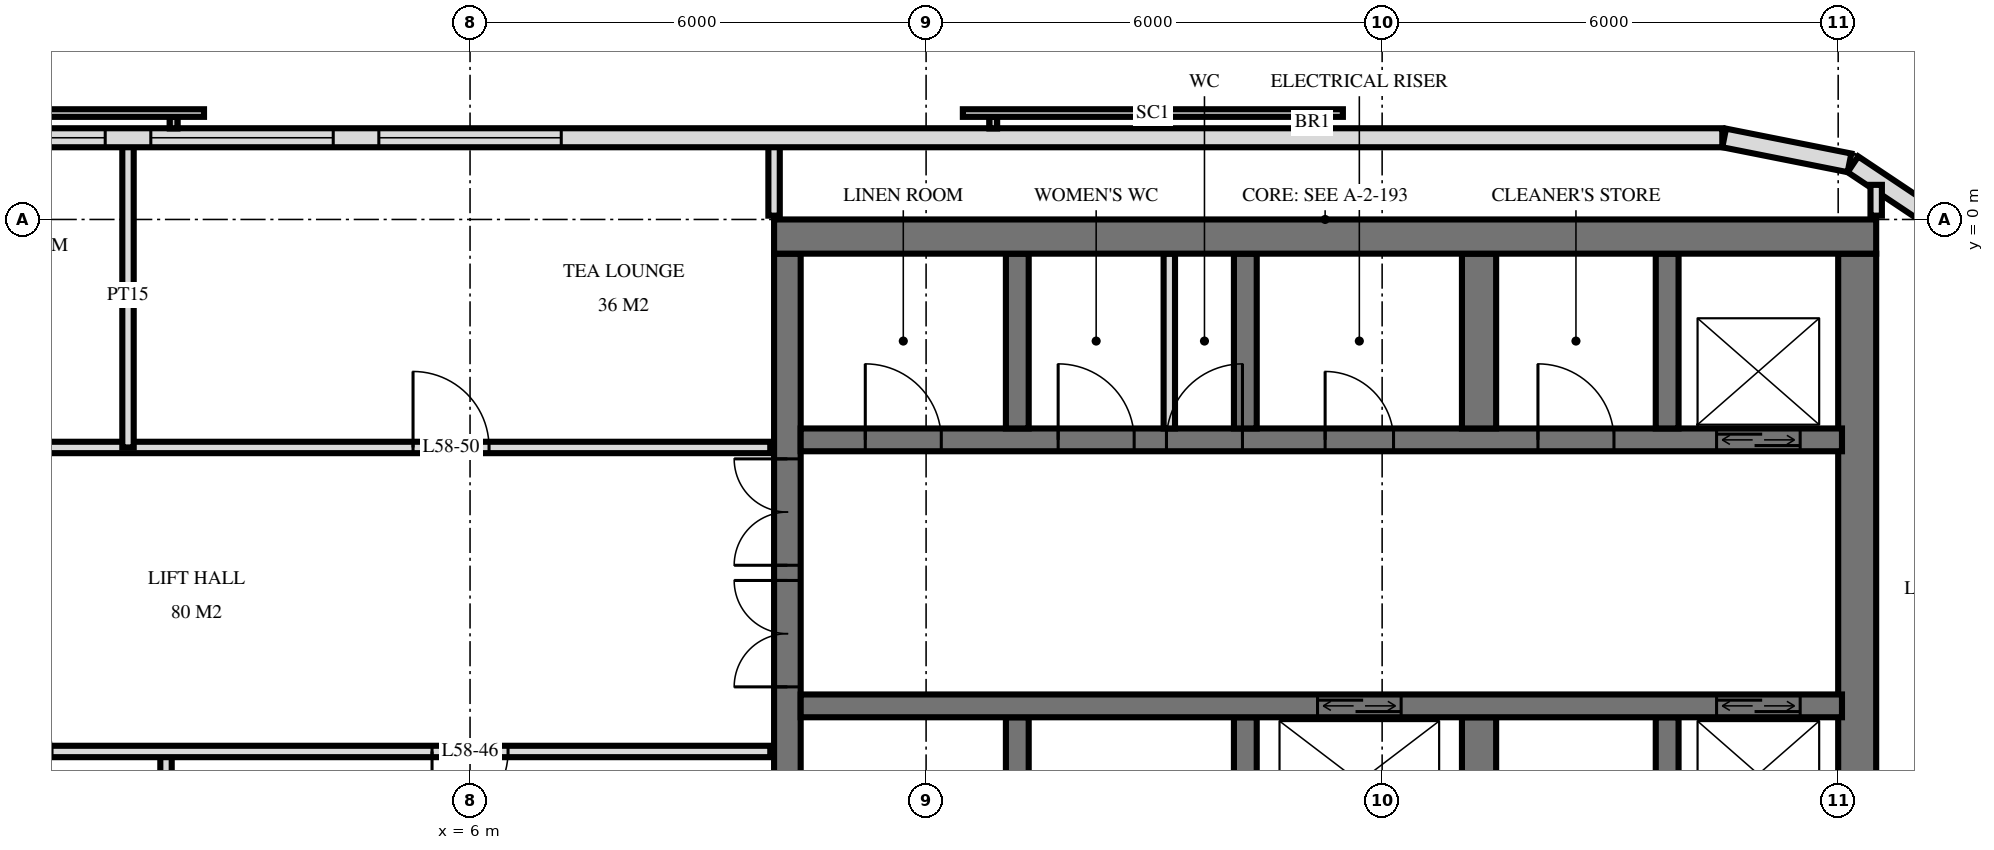
"""IFC4 building model, lengths in metres.
Left out: names, types, materials, properties, quantities, classifications, styles, units other than length and angle.
Written with IfcOpenShell. Run it as: python <this file> out.ifc"""

import sys

from ifc_helpers import new_model, si_unit, direction, frame, frame_2d, origin, place, context, subcontext, project, spatial, rectangle, extrude, element, fill, save


model = new_model("IFC4")
c1 = context("Model", 3, precision=1e-05, world=origin(), true_north=direction((0.0, 1.0)))
c2 = subcontext(c1, "Body", "Model", "MODEL_VIEW")
j1 = project(units=[si_unit("LENGTHUNIT", "METRE"), si_unit("PLANEANGLEUNIT", "RADIAN")], contexts=[c1])
p1 = place(None, origin())
s1 = spatial("IfcSite", under=j1, at=p1, CompositionType="ELEMENT")
p2 = place(p1, origin())
s2 = spatial("IfcBuilding", under=s1, at=p2, CompositionType="ELEMENT")
p3 = place(p2, frame((0.0, 0.0, 222.1)))
s3 = spatial("IfcBuildingStorey", under=s2, at=p3, CompositionType="ELEMENT", Elevation=222.1)
p4 = place(p3, frame((10.0, -0.225, 0.0), z_axis=(0.0, 0.0, 1.0), x_axis=(1.0, 0.0, 0.0)))
e1 = element("IfcWall", 1, at=p4, inside=s3, PredefinedType="SHEAR", context=c2, shape_type="SweptSolid", body=[
    extrude(rectangle(XDim=14.5, YDim=0.45, at=frame_2d((7.25, 0.0))), origin(), (0.0, 0.0, 1.0), 3.5),
])
p5 = place(p3, frame((10.175, -14.55, 0.0), z_axis=(0.0, 0.0, 1.0), x_axis=(0.0, 1.0, 0.0)))
e2 = element("IfcWall", 2, at=p5, inside=s3, PredefinedType="SHEAR", context=c2, shape_type="SweptSolid", body=[
    extrude(rectangle(XDim=14.1, YDim=0.35, at=frame_2d((7.05, 0.0))), origin(), (0.0, 0.0, 1.0), 3.5),
])
p6 = place(p5, frame((8.4, 0.0, 0.0)))
e3 = element("IfcOpeningElement", 3, at=p6, cuts=e2, PredefinedType="OPENING", context=c2, shape_type="SweptSolid", body=[
    extrude(rectangle(XDim=1.4, YDim=2.4, at=frame_2d((0.7, 1.2))), frame((0.0, 0.185, 0.0), z_axis=(0.0, -1.0, 0.0), x_axis=(1.0, 0.0, 0.0)), (0.0, 0.0, 1.0), 0.37),
])
p7 = place(p5, frame((10.0, 0.0, 0.0)))
e4 = element("IfcOpeningElement", 4, at=p7, cuts=e2, PredefinedType="OPENING", context=c2, shape_type="SweptSolid", body=[
    extrude(rectangle(XDim=1.4, YDim=2.4, at=frame_2d((0.7, 1.2))), frame((0.0, 0.185, 0.0), z_axis=(0.0, -1.0, 0.0), x_axis=(1.0, 0.0, 0.0)), (0.0, 0.0, 1.0), 0.37),
])
p8 = place(p5, frame((4.0, 0.0, 0.0)))
e5 = element("IfcOpeningElement", 5, at=p8, cuts=e2, PredefinedType="OPENING", context=c2, shape_type="SweptSolid", body=[
    extrude(rectangle(XDim=1.2, YDim=2.1, at=frame_2d((0.6, 1.05))), frame((0.0, 0.185, 0.0), z_axis=(0.0, -1.0, 0.0), x_axis=(1.0, 0.0, 0.0)), (0.0, 0.0, 1.0), 0.37),
])
p9 = place(p3, frame((24.25, -14.55, 0.0), z_axis=(0.0, 0.0, 1.0), x_axis=(0.0, 1.0, 0.0)))
e6 = element("IfcWall", 6, at=p9, inside=s3, PredefinedType="SHEAR", context=c2, shape_type="SweptSolid", body=[
    extrude(rectangle(XDim=14.1, YDim=0.5, at=frame_2d((7.05, 0.0))), origin(), (0.0, 0.0, 1.0), 3.5),
])
p10 = place(p3, frame((10.35, -2.9, 0.0), z_axis=(0.0, 0.0, 1.0), x_axis=(1.0, 0.0, 0.0)))
e7 = element("IfcWall", 7, at=p10, inside=s3, PredefinedType="SHEAR", context=c2, shape_type="SweptSolid", body=[
    extrude(rectangle(XDim=13.7, YDim=0.3, at=frame_2d((6.85, 0.0))), origin(), (0.0, 0.0, 1.0), 3.5),
])
p11 = place(p10, frame((12.05, 0.0, 0.0)))
e8 = element("IfcOpeningElement", 8, at=p11, cuts=e7, PredefinedType="OPENING", context=c2, shape_type="SweptSolid", body=[
    extrude(rectangle(XDim=1.1, YDim=2.1, at=frame_2d((0.55, 1.05))), frame((0.0, 0.16, 0.0), z_axis=(0.0, -1.0, 0.0), x_axis=(1.0, 0.0, 0.0)), (0.0, 0.0, 1.0), 0.32),
])
p12 = place(p10, frame((6.9, 0.0, 0.0)))
e9 = element("IfcOpeningElement", 9, at=p12, cuts=e7, PredefinedType="OPENING", context=c2, shape_type="SweptSolid", body=[
    extrude(rectangle(XDim=0.9, YDim=2.1, at=frame_2d((0.45, 1.05))), frame((0.0, 0.16, 0.0), z_axis=(0.0, -1.0, 0.0), x_axis=(1.0, 0.0, 0.0)), (0.0, 0.0, 1.0), 0.32),
])
p13 = place(p10, frame((0.85, 0.0, 0.0)))
e10 = element("IfcOpeningElement", 10, at=p13, cuts=e7, PredefinedType="OPENING", context=c2, shape_type="SweptSolid", body=[
    extrude(rectangle(XDim=1.0, YDim=2.1, at=frame_2d((0.5, 1.05))), frame((0.0, 0.16, 0.0), z_axis=(0.0, -1.0, 0.0), x_axis=(1.0, 0.0, 0.0)), (0.0, 0.0, 1.0), 0.32),
])
p14 = place(p10, frame((3.387, 0.0, 0.0)))
e11 = element("IfcOpeningElement", 11, at=p14, cuts=e7, PredefinedType="OPENING", context=c2, shape_type="SweptSolid", body=[
    extrude(rectangle(XDim=1.0, YDim=2.1, at=frame_2d((0.5, 1.05))), frame((0.0, 0.16, 0.0), z_axis=(0.0, -1.0, 0.0), x_axis=(1.0, 0.0, 0.0)), (0.0, 0.0, 1.0), 0.32),
])
p15 = place(p10, frame((4.812, 0.0, 0.0)))
e12 = element("IfcOpeningElement", 12, at=p15, cuts=e7, PredefinedType="OPENING", context=c2, shape_type="SweptSolid", body=[
    extrude(rectangle(XDim=1.0, YDim=2.1, at=frame_2d((0.5, 1.05))), frame((0.0, 0.16, 0.0), z_axis=(0.0, -1.0, 0.0), x_axis=(1.0, 0.0, 0.0)), (0.0, 0.0, 1.0), 0.32),
])
p16 = place(p10, frame((9.7, 0.0, 0.0)))
e13 = element("IfcOpeningElement", 13, at=p16, cuts=e7, PredefinedType="OPENING", context=c2, shape_type="SweptSolid", body=[
    extrude(rectangle(XDim=1.0, YDim=2.1, at=frame_2d((0.5, 1.05))), frame((0.0, 0.16, 0.0), z_axis=(0.0, -1.0, 0.0), x_axis=(1.0, 0.0, 0.0)), (0.0, 0.0, 1.0), 0.32),
])
p17 = place(p3, frame((10.35, -6.4, 0.0), z_axis=(0.0, 0.0, 1.0), x_axis=(1.0, 0.0, 0.0)))
e14 = element("IfcWall", 14, at=p17, inside=s3, PredefinedType="SHEAR", context=c2, shape_type="SweptSolid", body=[
    extrude(rectangle(XDim=13.7, YDim=0.3, at=frame_2d((6.85, 0.0))), origin(), (0.0, 0.0, 1.0), 3.5),
])
p18 = place(p17, frame((12.05, 0.0, 0.0)))
e15 = element("IfcOpeningElement", 15, at=p18, cuts=e14, PredefinedType="OPENING", context=c2, shape_type="SweptSolid", body=[
    extrude(rectangle(XDim=1.1, YDim=2.1, at=frame_2d((0.55, 1.05))), frame((0.0, 0.16, 0.0), z_axis=(0.0, -1.0, 0.0), x_axis=(1.0, 0.0, 0.0)), (0.0, 0.0, 1.0), 0.32),
])
p19 = place(p17, frame((6.8, 0.0, 0.0)))
e16 = element("IfcOpeningElement", 16, at=p19, cuts=e14, PredefinedType="OPENING", context=c2, shape_type="SweptSolid", body=[
    extrude(rectangle(XDim=1.1, YDim=2.1, at=frame_2d((0.55, 1.05))), frame((0.0, 0.16, 0.0), z_axis=(0.0, -1.0, 0.0), x_axis=(1.0, 0.0, 0.0)), (0.0, 0.0, 1.0), 0.32),
])
for number, where, z_axis, x_axis in (
    (17, (13.2, -2.75, 0.0), (0.0, 0.0, 1.0), (0.0, 1.0, 0.0)),
    (18, (13.2, -8.85, 0.0), (0.0, 0.0, 1.0), (0.0, 1.0, 0.0)),
    (19, (16.2, -2.75, 0.0), (0.0, 0.0, 1.0), (0.0, 1.0, 0.0)),
    (20, (16.2, -8.85, 0.0), (0.0, 0.0, 1.0), (0.0, 1.0, 0.0)),
):
    element("IfcWall", number, at=place(p3, frame(where, z_axis=z_axis, x_axis=x_axis)), inside=s3, PredefinedType="SHEAR", context=c2, shape_type="SweptSolid", body=[
        extrude(rectangle(XDim=2.3, YDim=0.3, at=frame_2d((1.15, 0.0))), origin(), (0.0, 0.0, 1.0), 3.5),
    ])
for number, where, z_axis, x_axis in (
    (21, (19.275, -2.75, 0.0), (0.0, 0.0, 1.0), (0.0, 1.0, 0.0)),
    (22, (19.275, -8.85, 0.0), (0.0, 0.0, 1.0), (0.0, 1.0, 0.0)),
):
    element("IfcWall", number, at=place(p3, frame(where, z_axis=z_axis, x_axis=x_axis)), inside=s3, PredefinedType="SHEAR", context=c2, shape_type="SweptSolid", body=[
        extrude(rectangle(XDim=2.3, YDim=0.45, at=frame_2d((1.15, 0.0))), origin(), (0.0, 0.0, 1.0), 3.5),
    ])
for number, where, z_axis, x_axis in (
    (23, (21.75, -2.75, 0.0), (0.0, 0.0, 1.0), (0.0, 1.0, 0.0)),
    (24, (21.75, -8.85, 0.0), (0.0, 0.0, 1.0), (0.0, 1.0, 0.0)),
):
    element("IfcWall", number, at=place(p3, frame(where, z_axis=z_axis, x_axis=x_axis)), inside=s3, PredefinedType="SHEAR", context=c2, shape_type="SweptSolid", body=[
        extrude(rectangle(XDim=2.3, YDim=0.3, at=frame_2d((1.15, 0.0))), origin(), (0.0, 0.0, 1.0), 3.5),
    ])
p20 = place(p3, frame((25.571, -0.194, 0.0), z_axis=(0.0, 0.0, 1.0), x_axis=(-0.831482937015, 0.55555029066, 0.0)))
e25 = element("IfcWall", 25, at=p20, inside=s3, PredefinedType="SOLIDWALL", context=c2, shape_type="SweptSolid", body=[
    extrude(rectangle(XDim=1.656, YDim=0.25, at=frame_2d((0.828, 0.0))), origin(), (0.0, 0.0, 1.0), 3.22),
])
p21 = place(p3, frame((24.149, 0.745, 0.0), z_axis=(0.0, 0.0, 1.0), x_axis=(-0.980803419081, 0.194999110559, 0.0)))
e26 = element("IfcWall", 26, at=p21, inside=s3, PredefinedType="SOLIDWALL", context=c2, shape_type="SweptSolid", body=[
    extrude(rectangle(XDim=1.681, YDim=0.25, at=frame_2d((0.841, 0.0))), origin(), (0.0, 0.0, 1.0), 3.22),
])
p22 = place(p3, frame((22.475, 1.075, 0.0), z_axis=(0.0, 0.0, 1.0), x_axis=(-1.0, 0.0, 0.0)))
e27 = element("IfcWall", 27, at=p22, inside=s3, PredefinedType="SOLIDWALL", context=c2, shape_type="SweptSolid", body=[
    extrude(rectangle(XDim=44.951, YDim=0.25, at=frame_2d((22.475, 0.0))), origin(), (0.0, 0.0, 1.0), 3.22),
])
p23 = place(p22, frame((15.275, 0.0, 0.9)))
e28 = element("IfcOpeningElement", 28, at=p23, cuts=e27, PredefinedType="OPENING", context=c2, shape_type="SweptSolid", body=[
    extrude(rectangle(XDim=2.4, YDim=1.5, at=frame_2d((1.2, 0.75))), frame((0.0, 0.135, 0.0), z_axis=(0.0, -1.0, 0.0), x_axis=(1.0, 0.0, 0.0)), (0.0, 0.0, 1.0), 0.27),
])
p24 = place(p22, frame((18.275, 0.0, 0.9)))
e29 = element("IfcOpeningElement", 29, at=p24, cuts=e27, PredefinedType="OPENING", context=c2, shape_type="SweptSolid", body=[
    extrude(rectangle(XDim=2.4, YDim=1.5, at=frame_2d((1.2, 0.75))), frame((0.0, 0.135, 0.0), z_axis=(0.0, -1.0, 0.0), x_axis=(1.0, 0.0, 0.0)), (0.0, 0.0, 1.0), 0.27),
])
p25 = place(p22, frame((21.275, 0.0, 0.9)))
e30 = element("IfcOpeningElement", 30, at=p25, cuts=e27, PredefinedType="OPENING", context=c2, shape_type="SweptSolid", body=[
    extrude(rectangle(XDim=2.4, YDim=1.5, at=frame_2d((1.2, 0.75))), frame((0.0, 0.135, 0.0), z_axis=(0.0, -1.0, 0.0), x_axis=(1.0, 0.0, 0.0)), (0.0, 0.0, 1.0), 0.27),
])
p26 = place(p22, frame((24.275, 0.0, 0.9)))
e31 = element("IfcOpeningElement", 31, at=p26, cuts=e27, PredefinedType="OPENING", context=c2, shape_type="SweptSolid", body=[
    extrude(rectangle(XDim=2.4, YDim=1.5, at=frame_2d((1.2, 0.75))), frame((0.0, 0.135, 0.0), z_axis=(0.0, -1.0, 0.0), x_axis=(1.0, 0.0, 0.0)), (0.0, 0.0, 1.0), 0.27),
])
p27 = place(p3, frame((15.2, -2.75, 0.0), z_axis=(0.0, 0.0, 1.0), x_axis=(0.0, 1.0, 0.0)))
e32 = element("IfcWall", 32, at=p27, inside=s3, PredefinedType="PARTITIONING", context=c2, shape_type="SweptSolid", body=[
    extrude(rectangle(XDim=2.3, YDim=0.15, at=frame_2d((1.15, 0.0))), origin(), (0.0, 0.0, 1.0), 3.2),
])
p28 = place(p3, frame((24.5, 0.05, 0.0), z_axis=(0.0, 0.0, 1.0), x_axis=(0.0, 1.0, 0.0)))
e33 = element("IfcWall", 33, at=p28, inside=s3, PredefinedType="PARTITIONING", context=c2, shape_type="SweptSolid", body=[
    extrude(rectangle(XDim=0.405, YDim=0.15, at=frame_2d((0.203, 0.0))), origin(), (0.0, 0.0, 1.0), 3.22),
])
p29 = place(p3, frame((10.0, 0.05, 0.0), z_axis=(0.0, 0.0, 1.0), x_axis=(0.0, 1.0, 0.0)))
e34 = element("IfcWall", 34, at=p29, inside=s3, PredefinedType="PARTITIONING", context=c2, shape_type="SweptSolid", body=[
    extrude(rectangle(XDim=0.97, YDim=0.15, at=frame_2d((0.485, 0.0))), origin(), (0.0, 0.0, 1.0), 3.22),
])
p30 = place(p3, frame((2.0, -11.0, 0.0), z_axis=(0.0, 0.0, 1.0), x_axis=(0.0, 1.0, 0.0)))
e35 = element("IfcWall", 35, at=p30, inside=s3, PredefinedType="PARTITIONING", context=c2, shape_type="SweptSolid", body=[
    extrude(rectangle(XDim=4.0, YDim=0.15, at=frame_2d((2.0, 0.0))), origin(), (0.0, 0.0, 1.0), 3.22),
])
p31 = place(p3, frame((1.5, -3.0, 0.0), z_axis=(0.0, 0.0, 1.0), x_axis=(0.0, 1.0, 0.0)))
e36 = element("IfcWall", 36, at=p31, inside=s3, PredefinedType="PARTITIONING", context=c2, shape_type="SweptSolid", body=[
    extrude(rectangle(XDim=4.02, YDim=0.15, at=frame_2d((2.01, 0.0))), origin(), (0.0, 0.0, 1.0), 3.22),
])
p32 = place(p3, frame((-9.95, -7.0, 0.0), z_axis=(0.0, 0.0, 1.0), x_axis=(1.0, 0.0, 0.0)))
e37 = element("IfcWall", 37, at=p32, inside=s3, PredefinedType="PARTITIONING", context=c2, shape_type="SweptSolid", body=[
    extrude(rectangle(XDim=19.9, YDim=0.15, at=frame_2d((9.95, 0.0))), origin(), (0.0, 0.0, 1.0), 3.22),
])
p33 = place(p32, frame((9.45, 0.0, 0.0)))
e38 = element("IfcOpeningElement", 38, at=p33, cuts=e37, PredefinedType="OPENING", context=c2, shape_type="SweptSolid", body=[
    extrude(rectangle(XDim=1.0, YDim=2.1, at=frame_2d((0.5, 1.05))), frame((0.0, 0.085, 0.0), z_axis=(0.0, -1.0, 0.0), x_axis=(1.0, 0.0, 0.0)), (0.0, 0.0, 1.0), 0.17),
])
p34 = place(p32, frame((15.45, 0.0, 0.0)))
e39 = element("IfcOpeningElement", 39, at=p34, cuts=e37, PredefinedType="OPENING", context=c2, shape_type="SweptSolid", body=[
    extrude(rectangle(XDim=1.0, YDim=2.1, at=frame_2d((0.5, 1.05))), frame((0.0, 0.085, 0.0), z_axis=(0.0, -1.0, 0.0), x_axis=(1.0, 0.0, 0.0)), (0.0, 0.0, 1.0), 0.17),
])
p35 = place(p3, frame((-9.95, -3.0, 0.0), z_axis=(0.0, 0.0, 1.0), x_axis=(1.0, 0.0, 0.0)))
e40 = element("IfcWall", 40, at=p35, inside=s3, PredefinedType="PARTITIONING", context=c2, shape_type="SweptSolid", body=[
    extrude(rectangle(XDim=19.9, YDim=0.15, at=frame_2d((9.95, 0.0))), origin(), (0.0, 0.0, 1.0), 3.22),
])
p36 = place(p35, frame((0.95, 0.0, 0.0)))
e41 = element("IfcOpeningElement", 41, at=p36, cuts=e40, PredefinedType="OPENING", context=c2, shape_type="SweptSolid", body=[
    extrude(rectangle(XDim=1.0, YDim=2.1, at=frame_2d((0.5, 1.05))), frame((0.0, 0.085, 0.0), z_axis=(0.0, -1.0, 0.0), x_axis=(1.0, 0.0, 0.0)), (0.0, 0.0, 1.0), 0.17),
])
p37 = place(p35, frame((3.7, 0.0, 0.0)))
e42 = element("IfcOpeningElement", 42, at=p37, cuts=e40, PredefinedType="OPENING", context=c2, shape_type="SweptSolid", body=[
    extrude(rectangle(XDim=1.0, YDim=2.1, at=frame_2d((0.5, 1.05))), frame((0.0, 0.085, 0.0), z_axis=(0.0, -1.0, 0.0), x_axis=(1.0, 0.0, 0.0)), (0.0, 0.0, 1.0), 0.17),
])
p38 = place(p35, frame((7.95, 0.0, 0.0)))
e43 = element("IfcOpeningElement", 43, at=p38, cuts=e40, PredefinedType="OPENING", context=c2, shape_type="SweptSolid", body=[
    extrude(rectangle(XDim=1.0, YDim=2.1, at=frame_2d((0.5, 1.05))), frame((0.0, 0.085, 0.0), z_axis=(0.0, -1.0, 0.0), x_axis=(1.0, 0.0, 0.0)), (0.0, 0.0, 1.0), 0.17),
])
p39 = place(p35, frame((15.2, 0.0, 0.0)))
e44 = element("IfcOpeningElement", 44, at=p39, cuts=e40, PredefinedType="OPENING", context=c2, shape_type="SweptSolid", body=[
    extrude(rectangle(XDim=1.0, YDim=2.1, at=frame_2d((0.5, 1.05))), frame((0.0, 0.085, 0.0), z_axis=(0.0, -1.0, 0.0), x_axis=(1.0, 0.0, 0.0)), (0.0, 0.0, 1.0), 0.17),
])
p40 = place(p23, origin())
e45 = element("IfcWindow", 45, at=p40, inside=s3, PartitioningType="SINGLE_PANEL", PredefinedType="WINDOW", context=c2, shape_type="SweptSolid", body=[
    extrude(rectangle(XDim=2.4, YDim=1.5, at=frame_2d((1.2, 0.75))), frame((0.0, 0.03, 0.0), z_axis=(0.0, -1.0, 0.0), x_axis=(1.0, 0.0, 0.0)), (0.0, 0.0, 1.0), 0.06),
])
fill(e28, e45)
p41 = place(p24, origin())
e46 = element("IfcWindow", 46, at=p41, inside=s3, PartitioningType="SINGLE_PANEL", PredefinedType="WINDOW", context=c2, shape_type="SweptSolid", body=[
    extrude(rectangle(XDim=2.4, YDim=1.5, at=frame_2d((1.2, 0.75))), frame((0.0, 0.03, 0.0), z_axis=(0.0, -1.0, 0.0), x_axis=(1.0, 0.0, 0.0)), (0.0, 0.0, 1.0), 0.06),
])
fill(e29, e46)
p42 = place(p25, origin())
e47 = element("IfcWindow", 47, at=p42, inside=s3, PartitioningType="SINGLE_PANEL", PredefinedType="WINDOW", context=c2, shape_type="SweptSolid", body=[
    extrude(rectangle(XDim=2.4, YDim=1.5, at=frame_2d((1.2, 0.75))), frame((0.0, 0.03, 0.0), z_axis=(0.0, -1.0, 0.0), x_axis=(1.0, 0.0, 0.0)), (0.0, 0.0, 1.0), 0.06),
])
fill(e30, e47)
p43 = place(p11, origin())
e48 = element("IfcDoor", 48, at=p43, inside=s3, OperationType="DOUBLE_DOOR_SLIDING", PredefinedType="USERDEFINED", context=c2, shape_type="SweptSolid", body=[
    extrude(rectangle(XDim=1.1, YDim=2.1, at=frame_2d((0.55, 1.05))), frame((0.0, 0.025, 0.0), z_axis=(0.0, -1.0, 0.0), x_axis=(1.0, 0.0, 0.0)), (0.0, 0.0, 1.0), 0.05),
])
fill(e8, e48)
p44 = place(p18, origin())
e49 = element("IfcDoor", 49, at=p44, inside=s3, OperationType="DOUBLE_DOOR_SLIDING", PredefinedType="USERDEFINED", context=c2, shape_type="SweptSolid", body=[
    extrude(rectangle(XDim=1.1, YDim=2.1, at=frame_2d((0.55, 1.05))), frame((0.0, 0.025, 0.0), z_axis=(0.0, -1.0, 0.0), x_axis=(1.0, 0.0, 0.0)), (0.0, 0.0, 1.0), 0.05),
])
fill(e15, e49)
p45 = place(p19, origin())
e50 = element("IfcDoor", 50, at=p45, inside=s3, OperationType="DOUBLE_DOOR_SLIDING", PredefinedType="USERDEFINED", context=c2, shape_type="SweptSolid", body=[
    extrude(rectangle(XDim=1.1, YDim=2.1, at=frame_2d((0.55, 1.05))), frame((0.0, 0.025, 0.0), z_axis=(0.0, -1.0, 0.0), x_axis=(1.0, 0.0, 0.0)), (0.0, 0.0, 1.0), 0.05),
])
fill(e16, e50)
p46 = place(p6, origin())
e51 = element("IfcDoor", 51, at=p46, inside=s3, OperationType="DOUBLE_DOOR_SINGLE_SWING", PredefinedType="DOOR", context=c2, shape_type="SweptSolid", body=[
    extrude(rectangle(XDim=1.4, YDim=2.4, at=frame_2d((0.7, 1.2))), frame((0.0, 0.025, 0.0), z_axis=(0.0, -1.0, 0.0), x_axis=(1.0, 0.0, 0.0)), (0.0, 0.0, 1.0), 0.05),
])
fill(e3, e51)
p47 = place(p7, origin())
e52 = element("IfcDoor", 52, at=p47, inside=s3, OperationType="DOUBLE_DOOR_SINGLE_SWING", PredefinedType="DOOR", context=c2, shape_type="SweptSolid", body=[
    extrude(rectangle(XDim=1.4, YDim=2.4, at=frame_2d((0.7, 1.2))), frame((0.0, 0.025, 0.0), z_axis=(0.0, -1.0, 0.0), x_axis=(1.0, 0.0, 0.0)), (0.0, 0.0, 1.0), 0.05),
])
fill(e4, e52)
p48 = place(p12, origin())
e53 = element("IfcDoor", 53, at=p48, inside=s3, OperationType="SINGLE_SWING_RIGHT", PredefinedType="DOOR", context=c2, shape_type="SweptSolid", body=[
    extrude(rectangle(XDim=0.9, YDim=2.1, at=frame_2d((0.45, 1.05))), frame((0.0, 0.025, 0.0), z_axis=(0.0, -1.0, 0.0), x_axis=(1.0, 0.0, 0.0)), (0.0, 0.0, 1.0), 0.05),
])
fill(e9, e53)
p49 = place(p13, origin())
e54 = element("IfcDoor", 54, at=p49, inside=s3, OperationType="SINGLE_SWING_RIGHT", PredefinedType="DOOR", context=c2, shape_type="SweptSolid", body=[
    extrude(rectangle(XDim=1.0, YDim=2.1, at=frame_2d((0.5, 1.05))), frame((0.0, 0.025, 0.0), z_axis=(0.0, -1.0, 0.0), x_axis=(1.0, 0.0, 0.0)), (0.0, 0.0, 1.0), 0.05),
])
fill(e10, e54)
p50 = place(p14, origin())
e55 = element("IfcDoor", 55, at=p50, inside=s3, OperationType="SINGLE_SWING_RIGHT", PredefinedType="DOOR", context=c2, shape_type="SweptSolid", body=[
    extrude(rectangle(XDim=1.0, YDim=2.1, at=frame_2d((0.5, 1.05))), frame((0.0, 0.025, 0.0), z_axis=(0.0, -1.0, 0.0), x_axis=(1.0, 0.0, 0.0)), (0.0, 0.0, 1.0), 0.05),
])
fill(e11, e55)
p51 = place(p15, origin())
e56 = element("IfcDoor", 56, at=p51, inside=s3, OperationType="SINGLE_SWING_LEFT", PredefinedType="DOOR", context=c2, shape_type="SweptSolid", body=[
    extrude(rectangle(XDim=1.0, YDim=2.1, at=frame_2d((0.5, 1.05))), frame((0.0, 0.025, 0.0), z_axis=(0.0, -1.0, 0.0), x_axis=(1.0, 0.0, 0.0)), (0.0, 0.0, 1.0), 0.05),
])
fill(e12, e56)
p52 = place(p16, origin())
e57 = element("IfcDoor", 57, at=p52, inside=s3, OperationType="SINGLE_SWING_RIGHT", PredefinedType="DOOR", context=c2, shape_type="SweptSolid", body=[
    extrude(rectangle(XDim=1.0, YDim=2.1, at=frame_2d((0.5, 1.05))), frame((0.0, 0.025, 0.0), z_axis=(0.0, -1.0, 0.0), x_axis=(1.0, 0.0, 0.0)), (0.0, 0.0, 1.0), 0.05),
])
fill(e13, e57)
p53 = place(p34, frame((0.5, 0.0, 0.0), z_axis=(0.0, 0.0, 1.0), x_axis=(-1.0, 0.0, 0.0)))
e58 = element("IfcDoor", 58, at=p53, inside=s3, OperationType="SINGLE_SWING_LEFT", PredefinedType="DOOR", context=c2, shape_type="SweptSolid", body=[
    extrude(rectangle(XDim=1.0, YDim=2.1, at=frame_2d((0.0, 1.05))), frame((0.0, -0.025, 0.0), z_axis=(0.0, 1.0, 0.0), x_axis=(-1.0, 0.0, 0.0)), (0.0, 0.0, 1.0), 0.05),
])
fill(e39, e58)
p54 = place(p39, origin())
e59 = element("IfcDoor", 59, at=p54, inside=s3, OperationType="SINGLE_SWING_RIGHT", PredefinedType="DOOR", context=c2, shape_type="SweptSolid", body=[
    extrude(rectangle(XDim=1.0, YDim=2.1, at=frame_2d((0.5, 1.05))), frame((0.0, 0.025, 0.0), z_axis=(0.0, -1.0, 0.0), x_axis=(1.0, 0.0, 0.0)), (0.0, 0.0, 1.0), 0.05),
])
fill(e44, e59)
save(model, sys.argv[1])
